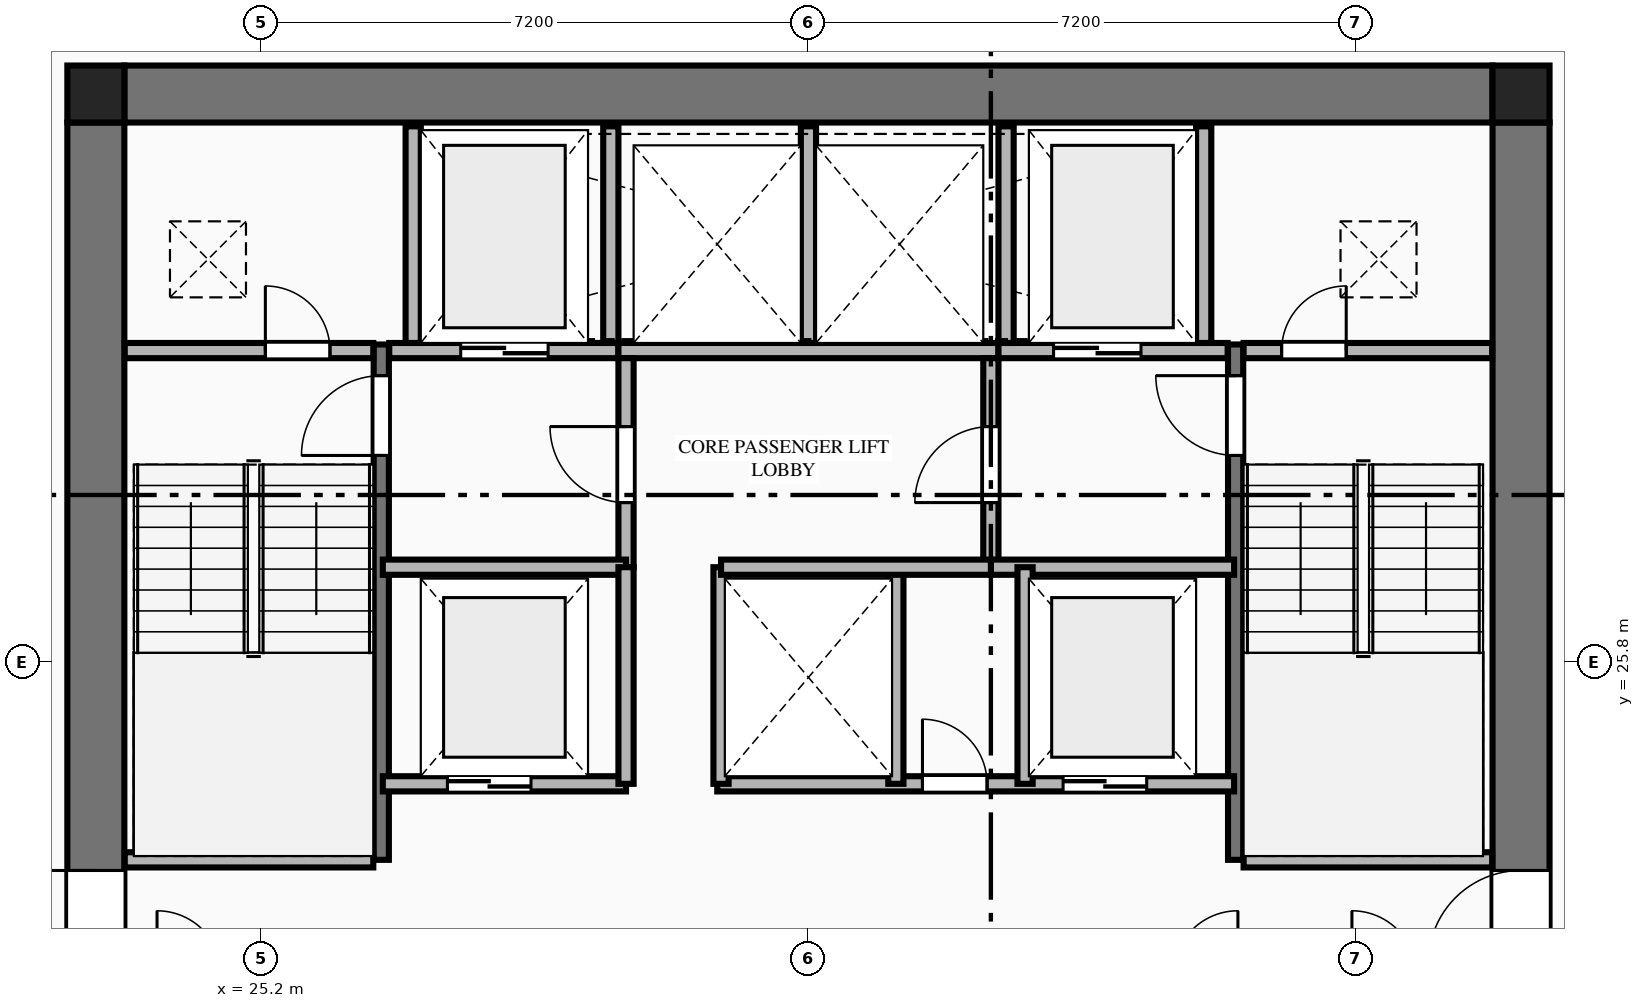
"""IFC4 building model, lengths in metres.
Left out: names, types, materials, properties, quantities, classifications, styles, units other than length and angle.
Written with IfcOpenShell. Run it as: python <this file> out.ifc"""

import sys

from ifc_helpers import new_model, si_unit, direction, frame, frame_2d, origin, origin_2d, place, context, subcontext, project, spatial, rectangle, extrude, element, fill, save


model = new_model("IFC4")
c1 = context("Model", 3, precision=1e-05, world=origin(), true_north=direction((0.0, 1.0)))
c2 = subcontext(c1, "Body", "Model", "MODEL_VIEW")
j1 = project(units=[si_unit("LENGTHUNIT", "METRE"), si_unit("PLANEANGLEUNIT", "RADIAN")], contexts=[c1])
p1 = place(None, origin())
s1 = spatial("IfcSite", under=j1, at=p1, CompositionType="ELEMENT")
p2 = place(p1, origin())
s2 = spatial("IfcBuilding", under=s1, at=p2, CompositionType="ELEMENT")
p3 = place(p2, frame((0.0, 0.0, 144.55)))
s3 = spatial("IfcBuildingStorey", under=s2, at=p3, CompositionType="ELEMENT", Elevation=144.55)
for number, where, z_axis, x_axis in (
    (1, (41.775, 33.275, 0.0), (0.0, 0.0, 1.0), (1.0, 0.0, 0.0)),
    (2, (23.025, 33.275, 0.0), (0.0, 0.0, 1.0), (1.0, 0.0, 0.0)),
):
    element("IfcColumn", number, at=place(p3, frame(where, z_axis=z_axis, x_axis=x_axis)), inside=s3, PredefinedType="COLUMN", context=c2, shape_type="SweptSolid", body=[
        extrude(rectangle(XDim=0.75, YDim=0.75, at=origin_2d()), origin(), (0.0, 0.0, 1.0), 3.55),
    ])
p4 = place(p3, frame((23.4, 33.275, 0.0), z_axis=(0.0, 0.0, 1.0), x_axis=(1.0, 0.0, 0.0)))
e3 = element("IfcWall", 3, at=p4, inside=s3, PredefinedType="SHEAR", context=c2, shape_type="SweptSolid", body=[
    extrude(rectangle(XDim=18.0, YDim=0.75, at=frame_2d((9.0, 0.0))), origin(), (0.0, 0.0, 1.0), 3.27),
])
p5 = place(p3, frame((23.025, 18.9, 0.0), z_axis=(0.0, 0.0, 1.0), x_axis=(0.0, 1.0, 0.0)))
e4 = element("IfcWall", 4, at=p5, inside=s3, PredefinedType="SHEAR", context=c2, shape_type="SweptSolid", body=[
    extrude(rectangle(XDim=14.0, YDim=0.75, at=frame_2d((7.0, 0.0))), origin(), (0.0, 0.0, 1.0), 3.27),
])
p6 = place(p5, frame((2.94, 0.0, 0.0)))
e5 = element("IfcOpeningElement", 5, at=p6, cuts=e4, PredefinedType="OPENING", context=c2, shape_type="SweptSolid", body=[
    extrude(rectangle(XDim=1.22, YDim=2.25, at=frame_2d((0.61, 1.125))), frame((0.0, 0.385, 0.0), z_axis=(0.0, -1.0, 0.0), x_axis=(1.0, 0.0, 0.0)), (0.0, 0.0, 1.0), 0.77),
])
p7 = place(p3, frame((41.775, 18.9, 0.0), z_axis=(0.0, 0.0, 1.0), x_axis=(0.0, 1.0, 0.0)))
e6 = element("IfcWall", 6, at=p7, inside=s3, PredefinedType="SHEAR", context=c2, shape_type="SweptSolid", body=[
    extrude(rectangle(XDim=14.0, YDim=0.75, at=frame_2d((7.0, 0.0))), origin(), (0.0, 0.0, 1.0), 3.27),
])
p8 = place(p7, frame((2.94, 0.0, 0.0)))
e7 = element("IfcOpeningElement", 7, at=p8, cuts=e6, PredefinedType="OPENING", context=c2, shape_type="SweptSolid", body=[
    extrude(rectangle(XDim=1.22, YDim=2.25, at=frame_2d((0.61, 1.125))), frame((0.0, 0.385, 0.0), z_axis=(0.0, -1.0, 0.0), x_axis=(1.0, 0.0, 0.0)), (0.0, 0.0, 1.0), 0.77),
])
p9 = place(p3, frame((26.78, 23.2, 0.0), z_axis=(0.0, 0.0, 1.0), x_axis=(0.0, 1.0, 0.0)))
e8 = element("IfcWall", 8, at=p9, inside=s3, PredefinedType="SHEAR", context=c2, shape_type="SweptSolid", body=[
    extrude(rectangle(XDim=6.78, YDim=0.2, at=frame_2d((3.39, 0.0))), origin(), (0.0, 0.0, 1.0), 3.55),
])
p10 = place(p9, frame((5.32, 0.0, 0.0)))
e9 = element("IfcOpeningElement", 9, at=p10, cuts=e8, PredefinedType="OPENING", context=c2, shape_type="SweptSolid", body=[
    extrude(rectangle(XDim=1.05, YDim=2.15, at=frame_2d((0.525, 1.075))), frame((0.0, 0.11, 0.0), z_axis=(0.0, -1.0, 0.0), x_axis=(1.0, 0.0, 0.0)), (0.0, 0.0, 1.0), 0.22),
])
p11 = place(p3, frame((23.405, 23.2, 0.0), z_axis=(0.0, 0.0, 1.0), x_axis=(1.0, 0.0, 0.0)))
e10 = element("IfcWall", 10, at=p11, inside=s3, PredefinedType="PLUMBINGWALL", context=c2, shape_type="SweptSolid", body=[
    extrude(rectangle(XDim=3.27, YDim=0.2, at=frame_2d((1.635, 0.0))), origin(), (0.0, 0.0, 1.0), 3.27),
])
p12 = place(p3, frame((38.02, 23.2, 0.0), z_axis=(0.0, 0.0, 1.0), x_axis=(0.0, 1.0, 0.0)))
e11 = element("IfcWall", 11, at=p12, inside=s3, PredefinedType="SHEAR", context=c2, shape_type="SweptSolid", body=[
    extrude(rectangle(XDim=6.78, YDim=0.2, at=frame_2d((3.39, 0.0))), origin(), (0.0, 0.0, 1.0), 3.55),
])
p13 = place(p12, frame((5.32, 0.0, 0.0)))
e12 = element("IfcOpeningElement", 12, at=p13, cuts=e11, PredefinedType="OPENING", context=c2, shape_type="SweptSolid", body=[
    extrude(rectangle(XDim=1.05, YDim=2.15, at=frame_2d((0.525, 1.075))), frame((0.0, 0.11, 0.0), z_axis=(0.0, -1.0, 0.0), x_axis=(1.0, 0.0, 0.0)), (0.0, 0.0, 1.0), 0.22),
])
p14 = place(p3, frame((38.125, 23.2, 0.0), z_axis=(0.0, 0.0, 1.0), x_axis=(1.0, 0.0, 0.0)))
e13 = element("IfcWall", 13, at=p14, inside=s3, PredefinedType="PLUMBINGWALL", context=c2, shape_type="SweptSolid", body=[
    extrude(rectangle(XDim=3.27, YDim=0.2, at=frame_2d((1.635, 0.0))), origin(), (0.0, 0.0, 1.0), 3.27),
])
p15 = place(p3, frame((23.405, 29.9, 0.0), z_axis=(0.0, 0.0, 1.0), x_axis=(1.0, 0.0, 0.0)))
e14 = element("IfcWall", 14, at=p15, inside=s3, PredefinedType="PLUMBINGWALL", context=c2, shape_type="SweptSolid", body=[
    extrude(rectangle(XDim=3.27, YDim=0.2, at=frame_2d((1.635, 0.0))), origin(), (0.0, 0.0, 1.0), 3.27),
])
p16 = place(p15, frame((1.85, 0.0, 0.0)))
e15 = element("IfcOpeningElement", 15, at=p16, cuts=e14, PredefinedType="OPENING", context=c2, shape_type="SweptSolid", body=[
    extrude(rectangle(XDim=0.85, YDim=2.05, at=frame_2d((0.425, 1.025))), frame((0.0, 0.11, 0.0), z_axis=(0.0, -1.0, 0.0), x_axis=(1.0, 0.0, 0.0)), (0.0, 0.0, 1.0), 0.22),
])
p17 = place(p3, frame((26.885, 29.9, 0.0), z_axis=(0.0, 0.0, 1.0), x_axis=(1.0, 0.0, 0.0)))
e16 = element("IfcWall", 16, at=p17, inside=s3, PredefinedType="PLUMBINGWALL", context=c2, shape_type="SweptSolid", body=[
    extrude(rectangle(XDim=3.015, YDim=0.2, at=frame_2d((1.507, 0.0))), origin(), (0.0, 0.0, 1.0), 3.27),
])
p18 = place(p17, frame((0.94, 0.0, 0.0)))
e17 = element("IfcOpeningElement", 17, at=p18, cuts=e16, PredefinedType="OPENING", context=c2, shape_type="SweptSolid", body=[
    extrude(rectangle(XDim=1.15, YDim=2.2, at=frame_2d((0.575, 1.1))), frame((0.0, 0.11, 0.0), z_axis=(0.0, -1.0, 0.0), x_axis=(1.0, 0.0, 0.0)), (0.0, 0.0, 1.0), 0.22),
])
p19 = place(p3, frame((29.9, 29.9, 0.0), z_axis=(0.0, 0.0, 1.0), x_axis=(1.0, 0.0, 0.0)))
e18 = element("IfcWall", 18, at=p19, inside=s3, PredefinedType="PLUMBINGWALL", context=c2, shape_type="SweptSolid", body=[
    extrude(rectangle(XDim=5.0, YDim=0.2, at=frame_2d((2.5, 0.0))), origin(), (0.0, 0.0, 1.0), 3.27),
])
p20 = place(p3, frame((34.9, 29.9, 0.0), z_axis=(0.0, 0.0, 1.0), x_axis=(1.0, 0.0, 0.0)))
e19 = element("IfcWall", 19, at=p20, inside=s3, PredefinedType="PLUMBINGWALL", context=c2, shape_type="SweptSolid", body=[
    extrude(rectangle(XDim=3.015, YDim=0.2, at=frame_2d((1.508, 0.0))), origin(), (0.0, 0.0, 1.0), 3.27),
])
p21 = place(p20, frame((0.725, 0.0, 0.0)))
e20 = element("IfcOpeningElement", 20, at=p21, cuts=e19, PredefinedType="OPENING", context=c2, shape_type="SweptSolid", body=[
    extrude(rectangle(XDim=1.15, YDim=2.2, at=frame_2d((0.575, 1.1))), frame((0.0, 0.11, 0.0), z_axis=(0.0, -1.0, 0.0), x_axis=(1.0, 0.0, 0.0)), (0.0, 0.0, 1.0), 0.22),
])
p22 = place(p3, frame((38.125, 29.9, 0.0), z_axis=(0.0, 0.0, 1.0), x_axis=(1.0, 0.0, 0.0)))
e21 = element("IfcWall", 21, at=p22, inside=s3, PredefinedType="PLUMBINGWALL", context=c2, shape_type="SweptSolid", body=[
    extrude(rectangle(XDim=3.27, YDim=0.2, at=frame_2d((1.635, 0.0))), origin(), (0.0, 0.0, 1.0), 3.27),
])
p23 = place(p22, frame((0.5, 0.0, 0.0)))
e22 = element("IfcOpeningElement", 22, at=p23, cuts=e21, PredefinedType="OPENING", context=c2, shape_type="SweptSolid", body=[
    extrude(rectangle(XDim=0.85, YDim=2.05, at=frame_2d((0.425, 1.025))), frame((0.0, 0.11, 0.0), z_axis=(0.0, -1.0, 0.0), x_axis=(1.0, 0.0, 0.0)), (0.0, 0.0, 1.0), 0.22),
])
for number, where, z_axis, x_axis in (
    (23, (27.2, 30.0, 0.0), (0.0, 0.0, 1.0), (0.0, 1.0, 0.0)),
    (24, (29.8, 30.0, 0.0), (0.0, 0.0, 1.0), (0.0, 1.0, 0.0)),
    (25, (32.4, 30.0, 0.0), (0.0, 0.0, 1.0), (0.0, 1.0, 0.0)),
    (26, (35.0, 30.0, 0.0), (0.0, 0.0, 1.0), (0.0, 1.0, 0.0)),
    (27, (37.6, 30.0, 0.0), (0.0, 0.0, 1.0), (0.0, 1.0, 0.0)),
):
    element("IfcWall", number, at=place(p3, frame(where, z_axis=z_axis, x_axis=x_axis)), inside=s3, PredefinedType="PLUMBINGWALL", context=c2, shape_type="SweptSolid", body=[
        extrude(rectangle(XDim=2.85, YDim=0.2, at=frame_2d((1.425, 0.0))), origin(), (0.0, 0.0, 1.0), 3.27),
    ])
p24 = place(p3, frame((30.0, 27.05, 0.0), z_axis=(0.0, 0.0, 1.0), x_axis=(0.0, 1.0, 0.0)))
e28 = element("IfcWall", 28, at=p24, inside=s3, PredefinedType="PLUMBINGWALL", context=c2, shape_type="SweptSolid", body=[
    extrude(rectangle(XDim=2.75, YDim=0.2, at=frame_2d((1.375, 0.0))), origin(), (0.0, 0.0, 1.0), 3.27),
])
p25 = place(p24, frame((0.85, 0.0, 0.0)))
e29 = element("IfcOpeningElement", 29, at=p25, cuts=e28, PredefinedType="OPENING", context=c2, shape_type="SweptSolid", body=[
    extrude(rectangle(XDim=1.0, YDim=2.15, at=frame_2d((0.5, 1.075))), frame((0.0, 0.11, 0.0), z_axis=(0.0, -1.0, 0.0), x_axis=(1.0, 0.0, 0.0)), (0.0, 0.0, 1.0), 0.22),
])
p26 = place(p3, frame((26.8, 27.05, 0.0), z_axis=(0.0, 0.0, 1.0), x_axis=(1.0, 0.0, 0.0)))
e30 = element("IfcWall", 30, at=p26, inside=s3, PredefinedType="PLUMBINGWALL", context=c2, shape_type="SweptSolid", body=[
    extrude(rectangle(XDim=3.2, YDim=0.2, at=frame_2d((1.6, 0.0))), origin(), (0.0, 0.0, 1.0), 3.27),
])
p27 = place(p3, frame((34.8, 27.05, 0.0), z_axis=(0.0, 0.0, 1.0), x_axis=(0.0, 1.0, 0.0)))
e31 = element("IfcWall", 31, at=p27, inside=s3, PredefinedType="PLUMBINGWALL", context=c2, shape_type="SweptSolid", body=[
    extrude(rectangle(XDim=2.75, YDim=0.2, at=frame_2d((1.375, 0.0))), origin(), (0.0, 0.0, 1.0), 3.27),
])
p28 = place(p27, frame((0.85, 0.0, 0.0)))
e32 = element("IfcOpeningElement", 32, at=p28, cuts=e31, PredefinedType="OPENING", context=c2, shape_type="SweptSolid", body=[
    extrude(rectangle(XDim=1.0, YDim=2.15, at=frame_2d((0.5, 1.075))), frame((0.0, 0.11, 0.0), z_axis=(0.0, -1.0, 0.0), x_axis=(1.0, 0.0, 0.0)), (0.0, 0.0, 1.0), 0.22),
])
p29 = place(p3, frame((34.8, 27.05, 0.0), z_axis=(0.0, 0.0, 1.0), x_axis=(1.0, 0.0, 0.0)))
e33 = element("IfcWall", 33, at=p29, inside=s3, PredefinedType="PLUMBINGWALL", context=c2, shape_type="SweptSolid", body=[
    extrude(rectangle(XDim=3.2, YDim=0.2, at=frame_2d((1.6, 0.0))), origin(), (0.0, 0.0, 1.0), 3.27),
])
p30 = place(p3, frame((26.8, 24.2, 0.0), z_axis=(0.0, 0.0, 1.0), x_axis=(1.0, 0.0, 0.0)))
e34 = element("IfcWall", 34, at=p30, inside=s3, PredefinedType="PLUMBINGWALL", context=c2, shape_type="SweptSolid", body=[
    extrude(rectangle(XDim=3.2, YDim=0.2, at=frame_2d((1.6, 0.0))), origin(), (0.0, 0.0, 1.0), 3.27),
])
p31 = place(p30, frame((0.85, 0.0, 0.0)))
e35 = element("IfcOpeningElement", 35, at=p31, cuts=e34, PredefinedType="OPENING", context=c2, shape_type="SweptSolid", body=[
    extrude(rectangle(XDim=1.1, YDim=2.2, at=frame_2d((0.55, 1.1))), frame((0.0, 0.11, 0.0), z_axis=(0.0, -1.0, 0.0), x_axis=(1.0, 0.0, 0.0)), (0.0, 0.0, 1.0), 0.22),
])
p32 = place(p3, frame((30.0, 24.2, 0.0), z_axis=(0.0, 0.0, 1.0), x_axis=(0.0, 1.0, 0.0)))
e36 = element("IfcWall", 36, at=p32, inside=s3, PredefinedType="PLUMBINGWALL", context=c2, shape_type="SweptSolid", body=[
    extrude(rectangle(XDim=2.85, YDim=0.2, at=frame_2d((1.425, 0.0))), origin(), (0.0, 0.0, 1.0), 3.27),
])
p33 = place(p3, frame((31.2, 24.2, 0.0), z_axis=(0.0, 0.0, 1.0), x_axis=(1.0, 0.0, 0.0)))
e37 = element("IfcWall", 37, at=p33, inside=s3, PredefinedType="PLUMBINGWALL", context=c2, shape_type="SweptSolid", body=[
    extrude(rectangle(XDim=6.8, YDim=0.2, at=frame_2d((3.4, 0.0))), origin(), (0.0, 0.0, 1.0), 3.27),
])
p34 = place(p33, frame((2.7, 0.0, 0.0)))
e38 = element("IfcOpeningElement", 38, at=p34, cuts=e37, PredefinedType="OPENING", context=c2, shape_type="SweptSolid", body=[
    extrude(rectangle(XDim=0.85, YDim=2.05, at=frame_2d((0.425, 1.025))), frame((0.0, 0.11, 0.0), z_axis=(0.0, -1.0, 0.0), x_axis=(1.0, 0.0, 0.0)), (0.0, 0.0, 1.0), 0.22),
])
p35 = place(p33, frame((4.55, 0.0, 0.0)))
e39 = element("IfcOpeningElement", 39, at=p35, cuts=e37, PredefinedType="OPENING", context=c2, shape_type="SweptSolid", body=[
    extrude(rectangle(XDim=1.1, YDim=2.2, at=frame_2d((0.55, 1.1))), frame((0.0, 0.11, 0.0), z_axis=(0.0, -1.0, 0.0), x_axis=(1.0, 0.0, 0.0)), (0.0, 0.0, 1.0), 0.22),
])
for number, where, z_axis, x_axis in (
    (40, (31.25, 24.2, 0.0), (0.0, 0.0, 1.0), (0.0, 1.0, 0.0)),
    (41, (33.55, 24.2, 0.0), (0.0, 0.0, 1.0), (0.0, 1.0, 0.0)),
    (42, (35.25, 24.2, 0.0), (0.0, 0.0, 1.0), (0.0, 1.0, 0.0)),
):
    element("IfcWall", number, at=place(p3, frame(where, z_axis=z_axis, x_axis=x_axis)), inside=s3, PredefinedType="PLUMBINGWALL", context=c2, shape_type="SweptSolid", body=[
        extrude(rectangle(XDim=2.85, YDim=0.2, at=frame_2d((1.425, 0.0))), origin(), (0.0, 0.0, 1.0), 3.27),
    ])
p36 = place(p3, frame((31.25, 27.05, 0.0), z_axis=(0.0, 0.0, 1.0), x_axis=(1.0, 0.0, 0.0)))
e43 = element("IfcWall", 43, at=p36, inside=s3, PredefinedType="PLUMBINGWALL", context=c2, shape_type="SweptSolid", body=[
    extrude(rectangle(XDim=3.55, YDim=0.2, at=frame_2d((1.775, 0.0))), origin(), (0.0, 0.0, 1.0), 3.27),
])
p37 = place(p6, origin())
e44 = element("IfcDoor", 44, at=p37, inside=s3, OperationType="SINGLE_SWING_RIGHT", PredefinedType="DOOR", context=c2, shape_type="SweptSolid", body=[
    extrude(rectangle(XDim=1.22, YDim=2.25, at=frame_2d((0.61, 1.125))), frame((0.0, 0.025, 0.0), z_axis=(0.0, -1.0, 0.0), x_axis=(1.0, 0.0, 0.0)), (0.0, 0.0, 1.0), 0.05),
])
fill(e5, e44)
p38 = place(p8, origin())
e45 = element("IfcDoor", 45, at=p38, inside=s3, OperationType="SINGLE_SWING_LEFT", PredefinedType="DOOR", context=c2, shape_type="SweptSolid", body=[
    extrude(rectangle(XDim=1.22, YDim=2.25, at=frame_2d((0.61, 1.125))), frame((0.0, 0.025, 0.0), z_axis=(0.0, -1.0, 0.0), x_axis=(1.0, 0.0, 0.0)), (0.0, 0.0, 1.0), 0.05),
])
fill(e7, e45)
p39 = place(p10, origin())
e46 = element("IfcDoor", 46, at=p39, inside=s3, OperationType="SINGLE_SWING_LEFT", PredefinedType="DOOR", context=c2, shape_type="SweptSolid", body=[
    extrude(rectangle(XDim=1.05, YDim=2.15, at=frame_2d((0.525, 1.075))), frame((0.0, 0.025, 0.0), z_axis=(0.0, -1.0, 0.0), x_axis=(1.0, 0.0, 0.0)), (0.0, 0.0, 1.0), 0.05),
])
fill(e9, e46)
p40 = place(p13, origin())
e47 = element("IfcDoor", 47, at=p40, inside=s3, OperationType="SINGLE_SWING_RIGHT", PredefinedType="DOOR", context=c2, shape_type="SweptSolid", body=[
    extrude(rectangle(XDim=1.05, YDim=2.15, at=frame_2d((0.525, 1.075))), frame((0.0, 0.025, 0.0), z_axis=(0.0, -1.0, 0.0), x_axis=(1.0, 0.0, 0.0)), (0.0, 0.0, 1.0), 0.05),
])
fill(e12, e47)
p41 = place(p16, origin())
e48 = element("IfcDoor", 48, at=p41, inside=s3, OperationType="SINGLE_SWING_LEFT", PredefinedType="DOOR", context=c2, shape_type="SweptSolid", body=[
    extrude(rectangle(XDim=0.85, YDim=2.05, at=frame_2d((0.425, 1.025))), frame((0.0, 0.025, 0.0), z_axis=(0.0, -1.0, 0.0), x_axis=(1.0, 0.0, 0.0)), (0.0, 0.0, 1.0), 0.05),
])
fill(e15, e48)
p42 = place(p23, origin())
e49 = element("IfcDoor", 49, at=p42, inside=s3, OperationType="SINGLE_SWING_RIGHT", PredefinedType="DOOR", context=c2, shape_type="SweptSolid", body=[
    extrude(rectangle(XDim=0.85, YDim=2.05, at=frame_2d((0.425, 1.025))), frame((0.0, 0.025, 0.0), z_axis=(0.0, -1.0, 0.0), x_axis=(1.0, 0.0, 0.0)), (0.0, 0.0, 1.0), 0.05),
])
fill(e22, e49)
p43 = place(p18, origin())
e50 = element("IfcDoor", 50, at=p43, inside=s3, OperationType="DOUBLE_DOOR_SLIDING", PredefinedType="DOOR", context=c2, shape_type="SweptSolid", body=[
    extrude(rectangle(XDim=1.15, YDim=2.2, at=frame_2d((0.575, 1.1))), frame((0.0, 0.025, 0.0), z_axis=(0.0, -1.0, 0.0), x_axis=(1.0, 0.0, 0.0)), (0.0, 0.0, 1.0), 0.05),
])
fill(e17, e50)
p44 = place(p21, origin())
e51 = element("IfcDoor", 51, at=p44, inside=s3, OperationType="DOUBLE_DOOR_SLIDING", PredefinedType="DOOR", context=c2, shape_type="SweptSolid", body=[
    extrude(rectangle(XDim=1.15, YDim=2.2, at=frame_2d((0.575, 1.1))), frame((0.0, 0.025, 0.0), z_axis=(0.0, -1.0, 0.0), x_axis=(1.0, 0.0, 0.0)), (0.0, 0.0, 1.0), 0.05),
])
fill(e20, e51)
p45 = place(p25, origin())
e52 = element("IfcDoor", 52, at=p45, inside=s3, OperationType="SINGLE_SWING_RIGHT", PredefinedType="DOOR", context=c2, shape_type="SweptSolid", body=[
    extrude(rectangle(XDim=1.0, YDim=2.15, at=frame_2d((0.5, 1.075))), frame((0.0, 0.025, 0.0), z_axis=(0.0, -1.0, 0.0), x_axis=(1.0, 0.0, 0.0)), (0.0, 0.0, 1.0), 0.05),
])
fill(e29, e52)
p46 = place(p28, origin())
e53 = element("IfcDoor", 53, at=p46, inside=s3, OperationType="SINGLE_SWING_LEFT", PredefinedType="DOOR", context=c2, shape_type="SweptSolid", body=[
    extrude(rectangle(XDim=1.0, YDim=2.15, at=frame_2d((0.5, 1.075))), frame((0.0, 0.025, 0.0), z_axis=(0.0, -1.0, 0.0), x_axis=(1.0, 0.0, 0.0)), (0.0, 0.0, 1.0), 0.05),
])
fill(e32, e53)
p47 = place(p31, origin())
e54 = element("IfcDoor", 54, at=p47, inside=s3, OperationType="DOUBLE_DOOR_SLIDING", PredefinedType="DOOR", context=c2, shape_type="SweptSolid", body=[
    extrude(rectangle(XDim=1.1, YDim=2.2, at=frame_2d((0.55, 1.1))), frame((0.0, 0.025, 0.0), z_axis=(0.0, -1.0, 0.0), x_axis=(1.0, 0.0, 0.0)), (0.0, 0.0, 1.0), 0.05),
])
fill(e35, e54)
p48 = place(p34, origin())
e55 = element("IfcDoor", 55, at=p48, inside=s3, OperationType="SINGLE_SWING_LEFT", PredefinedType="DOOR", context=c2, shape_type="SweptSolid", body=[
    extrude(rectangle(XDim=0.85, YDim=2.05, at=frame_2d((0.425, 1.025))), frame((0.0, 0.025, 0.0), z_axis=(0.0, -1.0, 0.0), x_axis=(1.0, 0.0, 0.0)), (0.0, 0.0, 1.0), 0.05),
])
fill(e38, e55)
p49 = place(p35, origin())
e56 = element("IfcDoor", 56, at=p49, inside=s3, OperationType="DOUBLE_DOOR_SLIDING", PredefinedType="DOOR", context=c2, shape_type="SweptSolid", body=[
    extrude(rectangle(XDim=1.1, YDim=2.2, at=frame_2d((0.55, 1.1))), frame((0.0, 0.025, 0.0), z_axis=(0.0, -1.0, 0.0), x_axis=(1.0, 0.0, 0.0)), (0.0, 0.0, 1.0), 0.05),
])
fill(e39, e56)
save(model, sys.argv[1])
